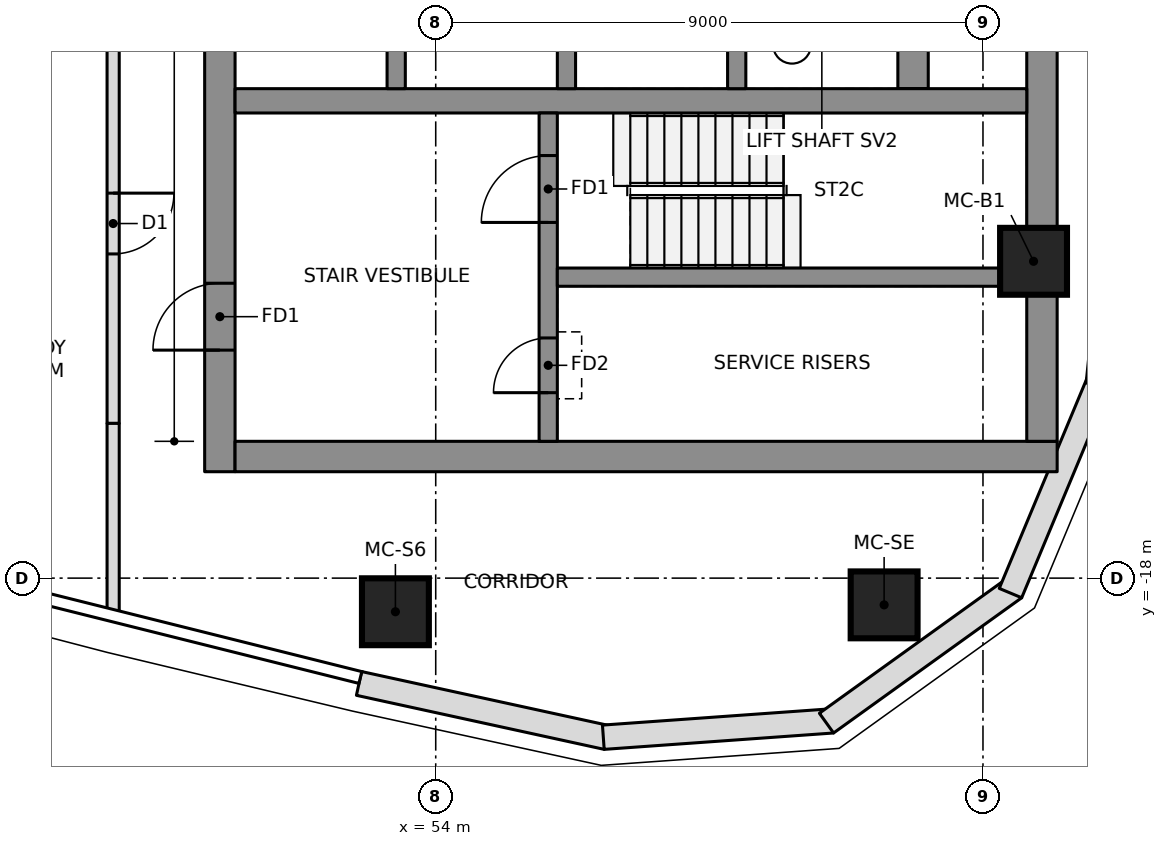
"""IFC4 building model, lengths in metres.
Left out: names, types, materials, properties, quantities, classifications, styles, units other than length and angle.
Written with IfcOpenShell. Run it as: python <this file> out.ifc"""

import sys

from ifc_helpers import new_model, si_unit, direction, frame, frame_2d, origin, origin_2d, place, context, subcontext, project, spatial, polyline, rectangle, outline, extrude, element, fill, save


model = new_model("IFC4")
c1 = context("Model", 3, precision=1e-05, world=origin(), true_north=direction((0.0, 1.0)))
c2 = subcontext(c1, "Body", "Model", "MODEL_VIEW")
j1 = project(units=[si_unit("LENGTHUNIT", "METRE"), si_unit("PLANEANGLEUNIT", "RADIAN")], contexts=[c1])
p1 = place(None, origin())
s1 = spatial("IfcSite", under=j1, at=p1, CompositionType="ELEMENT")
p2 = place(p1, origin())
s2 = spatial("IfcBuilding", under=s1, at=p2, CompositionType="ELEMENT")
p3 = place(p2, frame((0.0, 0.0, 271.45)))
s3 = spatial("IfcBuildingStorey", under=s2, at=p3, CompositionType="ELEMENT", Elevation=271.45)
p4 = place(p3, frame((50.45, -16.25, 0.0), z_axis=(0.0, 0.0, 1.0), x_axis=(0.0, 1.0, 0.0)))
e1 = element("IfcWall", 1, at=p4, inside=s3, PredefinedType="SHEAR", context=c2, shape_type="SweptSolid", body=[
    extrude(rectangle(XDim=9.6, YDim=0.5, at=frame_2d((4.8, 0.0))), origin(), (0.0, 0.0, 1.0), 3.55),
])
p5 = place(p4, frame((2.0, 0.0, 0.0)))
e2 = element("IfcOpeningElement", 2, at=p5, cuts=e1, PredefinedType="OPENING", context=c2, shape_type="SweptSolid", body=[
    extrude(rectangle(XDim=1.1, YDim=2.1, at=frame_2d((0.55, 1.05))), frame((0.0, 0.26, 0.0), z_axis=(0.0, -1.0, 0.0), x_axis=(1.0, 0.0, 0.0)), (0.0, 0.0, 1.0), 0.52),
])
p6 = place(p3, frame((50.7, -16.0, 0.0), z_axis=(0.0, 0.0, 1.0), x_axis=(1.0, 0.0, 0.0)))
e3 = element("IfcWall", 3, at=p6, inside=s3, PredefinedType="SHEAR", context=c2, shape_type="SweptSolid", body=[
    extrude(rectangle(XDim=13.52, YDim=0.5, at=frame_2d((6.76, 0.0))), origin(), (0.0, 0.0, 1.0), 3.55),
])
p7 = place(p3, frame((63.97, -15.75, 0.0), z_axis=(0.0, 0.0, 1.0), x_axis=(0.0, 1.0, 0.0)))
e4 = element("IfcWall", 4, at=p7, inside=s3, PredefinedType="SHEAR", context=c2, shape_type="SweptSolid", body=[
    extrude(rectangle(XDim=8.847, YDim=0.5, at=frame_2d((4.423, 0.0))), origin(), (0.0, 0.0, 1.0), 3.55),
])
p8 = place(p3, frame((61.85, -9.95, 0.0), z_axis=(0.0, 0.0, 1.0), x_axis=(0.0, 1.0, 0.0)))
e5 = element("IfcWall", 5, at=p8, inside=s3, PredefinedType="SHEAR", context=c2, shape_type="SweptSolid", body=[
    extrude(rectangle(XDim=19.9, YDim=0.5, at=frame_2d((9.95, 0.0))), origin(), (0.0, 0.0, 1.0), 3.55),
])
p9 = place(p3, frame((50.7, -10.15, 0.0), z_axis=(0.0, 0.0, 1.0), x_axis=(1.0, 0.0, 0.0)))
e6 = element("IfcWall", 6, at=p9, inside=s3, PredefinedType="SHEAR", context=c2, shape_type="SweptSolid", body=[
    extrude(rectangle(XDim=13.02, YDim=0.4, at=frame_2d((6.51, 0.0))), origin(), (0.0, 0.0, 1.0), 3.55),
])
for number, where, z_axis, x_axis in (
    (7, (53.35, -9.95, 0.0), (0.0, 0.0, 1.0), (0.0, 1.0, 0.0)),
    (8, (56.15, -9.95, 0.0), (0.0, 0.0, 1.0), (0.0, 1.0, 0.0)),
    (9, (58.95, -9.95, 0.0), (0.0, 0.0, 1.0), (0.0, 1.0, 0.0)),
):
    element("IfcWall", number, at=place(p3, frame(where, z_axis=z_axis, x_axis=x_axis)), inside=s3, PredefinedType="SHEAR", context=c2, shape_type="SweptSolid", body=[
        extrude(rectangle(XDim=3.0, YDim=0.3, at=frame_2d((1.5, 0.0))), origin(), (0.0, 0.0, 1.0), 3.55),
    ])
p10 = place(p3, frame((55.85, -15.75, 0.0), z_axis=(0.0, 0.0, 1.0), x_axis=(0.0, 1.0, 0.0)))
e10 = element("IfcWall", 10, at=p10, inside=s3, PredefinedType="SHEAR", context=c2, shape_type="SweptSolid", body=[
    extrude(rectangle(XDim=5.4, YDim=0.3, at=frame_2d((2.7, 0.0))), origin(), (0.0, 0.0, 1.0), 3.55),
])
p11 = place(p10, frame((3.6, 0.0, 0.0)))
e11 = element("IfcOpeningElement", 11, at=p11, cuts=e10, PredefinedType="OPENING", context=c2, shape_type="SweptSolid", body=[
    extrude(rectangle(XDim=1.1, YDim=2.1, at=frame_2d((0.55, 1.05))), frame((0.0, 0.16, 0.0), z_axis=(0.0, -1.0, 0.0), x_axis=(1.0, 0.0, 0.0)), (0.0, 0.0, 1.0), 0.32),
])
p12 = place(p10, frame((0.8, 0.0, 0.0)))
e12 = element("IfcOpeningElement", 12, at=p12, cuts=e10, PredefinedType="OPENING", context=c2, shape_type="SweptSolid", body=[
    extrude(rectangle(XDim=0.9, YDim=2.1, at=frame_2d((0.45, 1.05))), frame((0.0, 0.16, 0.0), z_axis=(0.0, -1.0, 0.0), x_axis=(1.0, 0.0, 0.0)), (0.0, 0.0, 1.0), 0.32),
])
p13 = place(p3, frame((56.0, -13.05, 0.0), z_axis=(0.0, 0.0, 1.0), x_axis=(1.0, 0.0, 0.0)))
e13 = element("IfcWall", 13, at=p13, inside=s3, PredefinedType="SHEAR", context=c2, shape_type="SweptSolid", body=[
    extrude(rectangle(XDim=7.72, YDim=0.3, at=frame_2d((3.86, 0.0))), origin(), (0.0, 0.0, 1.0), 3.55),
])
for number, where, z_axis, x_axis in (
    (14, (53.337, -18.553, 0.0), (0.0, 0.0, 1.0), (1.0, 0.0, 0.0)),
    (15, (61.374, -18.44, 0.0), (0.0, 0.0, 1.0), (1.0, 0.0, 0.0)),
    (16, (63.832, -12.789, 0.0), (0.0, 0.0, 1.0), (1.0, 0.0, 0.0)),
):
    element("IfcColumn", number, at=place(p3, frame(where, z_axis=z_axis, x_axis=x_axis)), inside=s3, PredefinedType="COLUMN", context=c2, shape_type="SweptSolid", body=[
        extrude(rectangle(XDim=1.1, YDim=1.1, at=origin_2d()), origin(), (0.0, 0.0, 1.0), 3.55),
    ])
p14 = place(p3, frame((52.738, -19.732, 0.0), z_axis=(0.0, 0.0, 1.0), x_axis=(0.977020225348, -0.213146614471, 0.0)))
e17 = element("IfcWall", 17, at=p14, inside=s3, PredefinedType="NOTDEFINED", context=c2, shape_type="SweptSolid", body=[
    extrude(outline(polyline([(0.0, -0.2), (4.171, -0.2), (4.113, 0.2), (0.0, 0.2), (0.0, -0.2)])), origin(), (0.0, 0.0, 1.0), 3.25),
])
p15 = place(p3, frame((56.785, -20.615, 0.0), z_axis=(0.0, 0.0, 1.0), x_axis=(0.99746272096, 0.071190731806, 0.0)))
e18 = element("IfcWall", 18, at=p15, inside=s3, PredefinedType="NOTDEFINED", context=c2, shape_type="SweptSolid", body=[
    extrude(outline(polyline([(-0.029, -0.2), (3.753, -0.2), (3.64, 0.2), (0.029, 0.2), (-0.029, -0.2)])), origin(), (0.0, 0.0, 1.0), 3.25),
])
p16 = place(p3, frame((60.472, -20.352, 0.0), z_axis=(0.0, 0.0, 1.0), x_axis=(0.811962548682, 0.583709533533, 0.0)))
e19 = element("IfcWall", 19, at=p16, inside=s3, PredefinedType="NOTDEFINED", context=c2, shape_type="SweptSolid", body=[
    extrude(outline(polyline([(-0.057, -0.2), (3.753, -0.2), (3.64, 0.2), (0.057, 0.2), (-0.057, -0.2)])), origin(), (0.0, 0.0, 1.0), 3.25),
])
p17 = place(p3, frame((63.474, -18.194, 0.0), z_axis=(0.0, 0.0, 1.0), x_axis=(0.385285857918, 0.922797273343, 0.0)))
e20 = element("IfcWall", 20, at=p17, inside=s3, PredefinedType="NOTDEFINED", context=c2, shape_type="SweptSolid", body=[
    extrude(outline(polyline([(-0.057, -0.2), (3.726, -0.2), (3.667, 0.2), (0.057, 0.2), (-0.057, -0.2)])), origin(), (0.0, 0.0, 1.0), 3.25),
])
p18 = place(p3, frame((64.898, -14.782, 0.0), z_axis=(0.0, 0.0, 1.0), x_axis=(0.102249826987, 0.994758751096, 0.0)))
e21 = element("IfcWall", 21, at=p18, inside=s3, PredefinedType="NOTDEFINED", context=c2, shape_type="SweptSolid", body=[
    extrude(outline(polyline([(-0.03, -0.2), (4.237, -0.2), (4.23, 0.2), (0.03, 0.2), (-0.03, -0.2)])), origin(), (0.0, 0.0, 1.0), 3.25),
])
p19 = place(p3, frame((48.695, -8.852, 0.0), z_axis=(0.0, 0.0, 1.0), x_axis=(0.0, -1.0, 0.0)))
e22 = element("IfcWall", 22, at=p19, inside=s3, PredefinedType="PARTITIONING", context=c2, shape_type="SweptSolid", body=[
    extrude(rectangle(XDim=6.603, YDim=0.2, at=frame_2d((3.302, 0.0))), origin(), (0.0, 0.0, 1.0), 3.25),
])
p20 = place(p19, frame((2.816, 0.0, 0.0)))
e23 = element("IfcOpeningElement", 23, at=p20, cuts=e22, PredefinedType="OPENING", context=c2, shape_type="SweptSolid", body=[
    extrude(rectangle(XDim=1.0, YDim=2.1, at=frame_2d((0.5, 1.05))), frame((0.0, 0.11, 0.0), z_axis=(0.0, -1.0, 0.0), x_axis=(1.0, 0.0, 0.0)), (0.0, 0.0, 1.0), 0.22),
])
p21 = place(p3, frame((48.695, -15.455, 0.0), z_axis=(0.0, 0.0, 1.0), x_axis=(0.0, -1.0, 0.0)))
e24 = element("IfcWall", 24, at=p21, inside=s3, PredefinedType="PARTITIONING", context=c2, shape_type="SweptSolid", body=[
    extrude(rectangle(XDim=3.098, YDim=0.2, at=frame_2d((1.549, 0.0))), origin(), (0.0, 0.0, 1.0), 3.25),
])
p22 = place(p20, origin())
e25 = element("IfcDoor", 25, at=p22, inside=s3, OperationType="SINGLE_SWING_LEFT", PredefinedType="DOOR", context=c2, shape_type="SweptSolid", body=[
    extrude(rectangle(XDim=1.0, YDim=2.1, at=frame_2d((0.5, 1.05))), frame((0.0, 0.025, 0.0), z_axis=(0.0, -1.0, 0.0), x_axis=(1.0, 0.0, 0.0)), (0.0, 0.0, 1.0), 0.05),
])
fill(e23, e25)
p23 = place(p11, origin())
e26 = element("IfcDoor", 26, at=p23, inside=s3, OperationType="SINGLE_SWING_RIGHT", PredefinedType="DOOR", context=c2, shape_type="SweptSolid", body=[
    extrude(rectangle(XDim=1.1, YDim=2.1, at=frame_2d((0.55, 1.05))), frame((0.0, 0.025, 0.0), z_axis=(0.0, -1.0, 0.0), x_axis=(1.0, 0.0, 0.0)), (0.0, 0.0, 1.0), 0.05),
])
fill(e11, e26)
p24 = place(p5, origin())
e27 = element("IfcDoor", 27, at=p24, inside=s3, OperationType="SINGLE_SWING_RIGHT", PredefinedType="DOOR", context=c2, shape_type="SweptSolid", body=[
    extrude(rectangle(XDim=1.1, YDim=2.1, at=frame_2d((0.55, 1.05))), frame((0.0, 0.025, 0.0), z_axis=(0.0, -1.0, 0.0), x_axis=(1.0, 0.0, 0.0)), (0.0, 0.0, 1.0), 0.05),
])
fill(e2, e27)
p25 = place(p12, origin())
e28 = element("IfcDoor", 28, at=p25, inside=s3, OperationType="SINGLE_SWING_LEFT", PredefinedType="DOOR", context=c2, shape_type="SweptSolid", body=[
    extrude(rectangle(XDim=0.9, YDim=2.1, at=frame_2d((0.45, 1.05))), frame((0.0, 0.025, 0.0), z_axis=(0.0, -1.0, 0.0), x_axis=(1.0, 0.0, 0.0)), (0.0, 0.0, 1.0), 0.05),
])
fill(e12, e28)
save(model, sys.argv[1])
